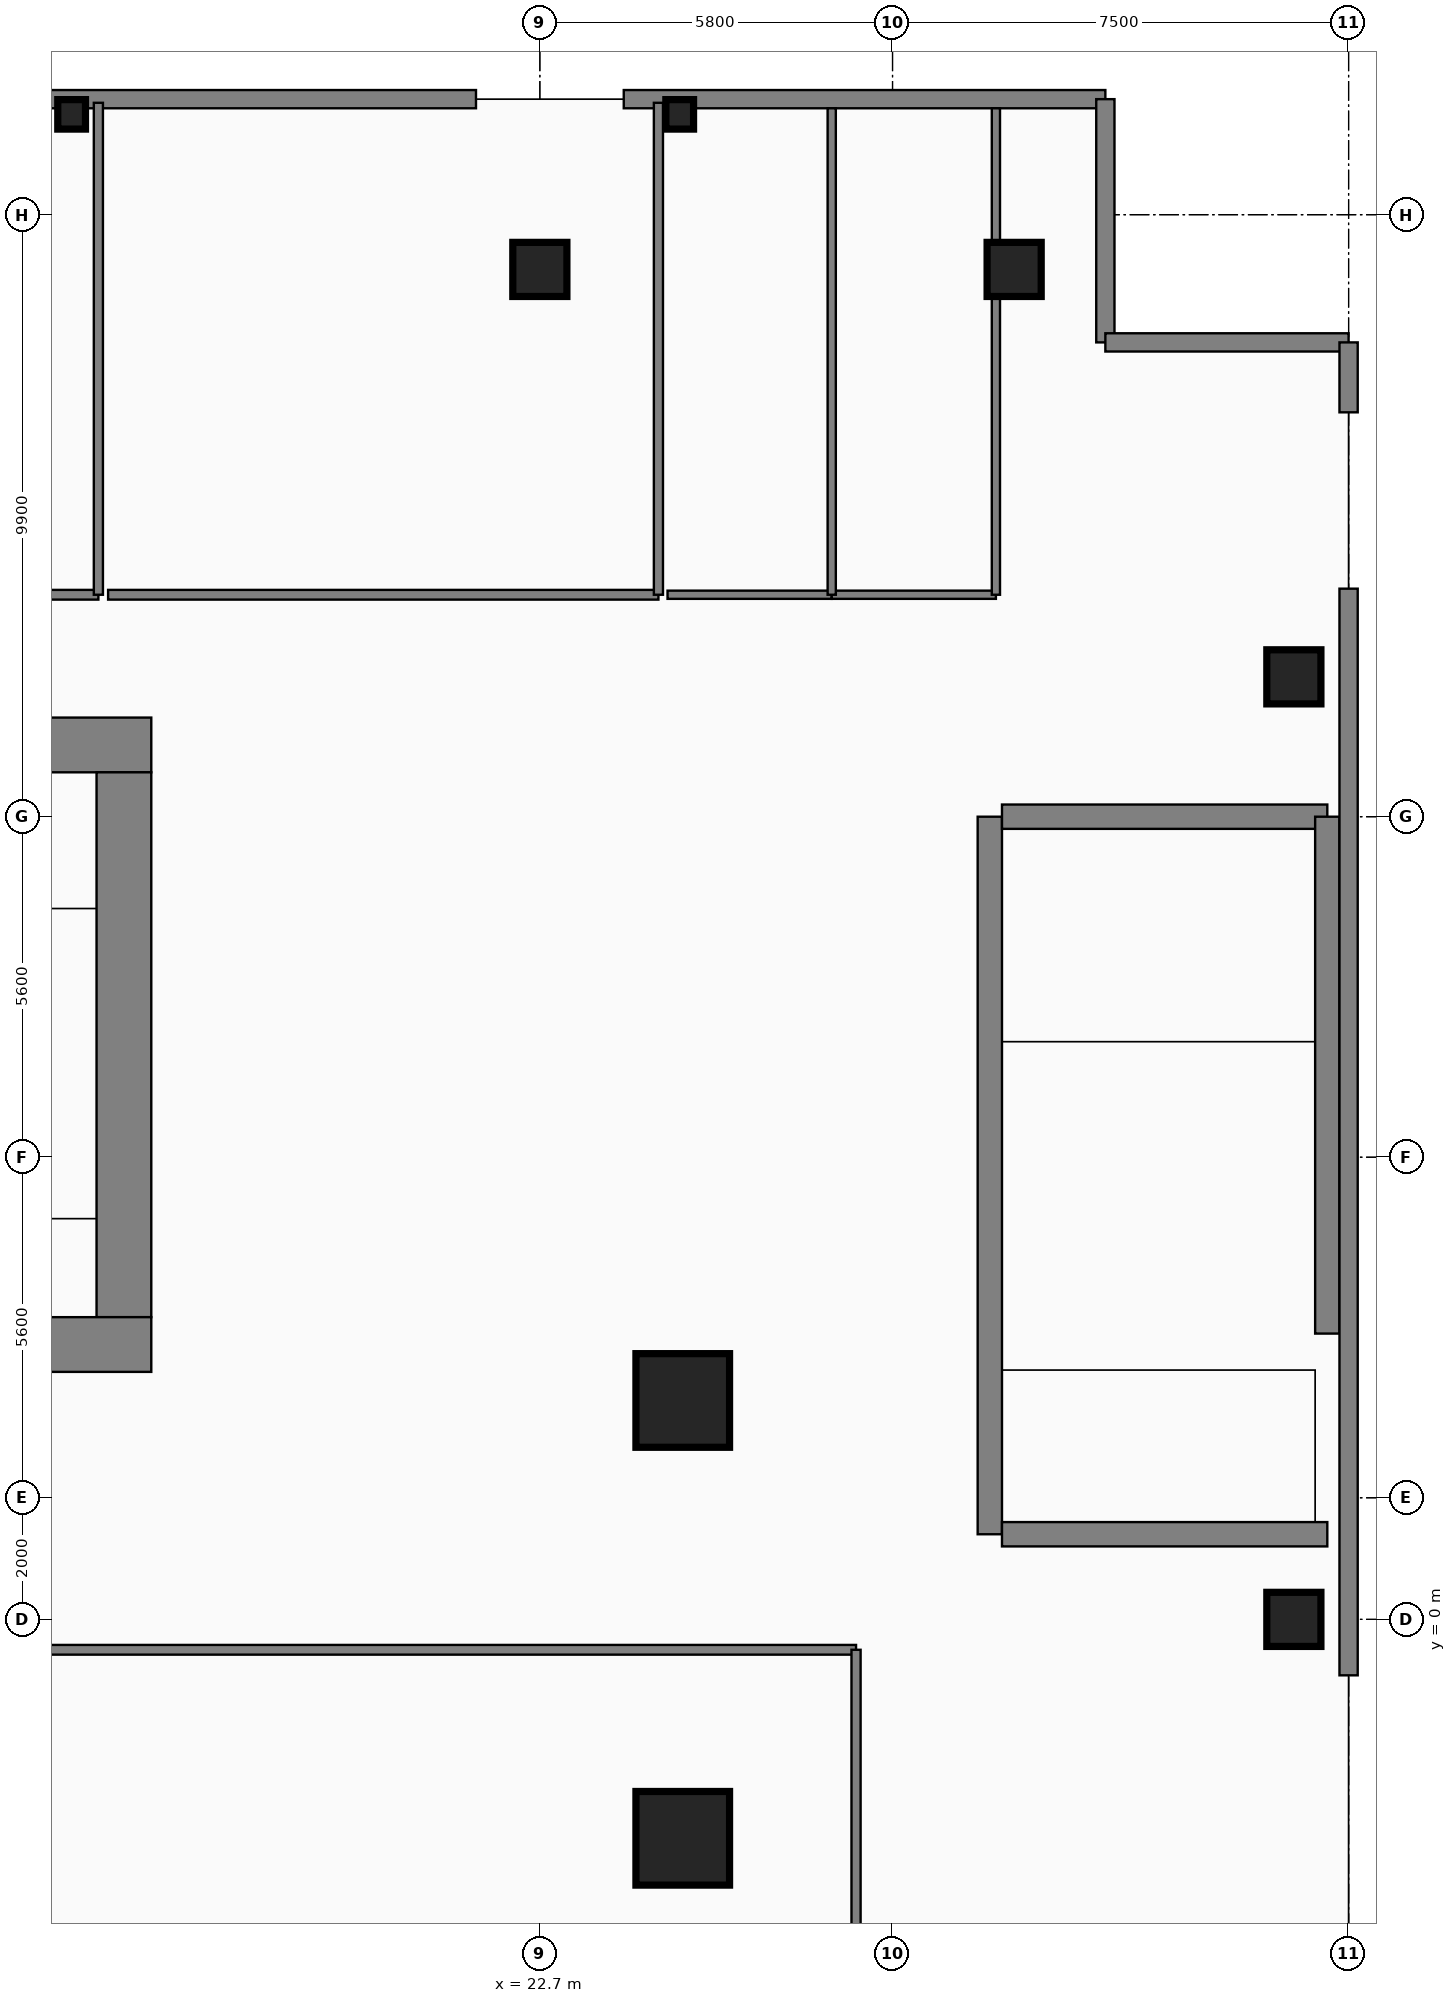
"""IFC4 building model, lengths in metres.
Left out: names, types, materials, properties, quantities, classifications, styles, units other than length and angle.
Written with IfcOpenShell. Run it as: python <this file> out.ifc"""

import sys

from ifc_helpers import new_model, si_unit, direction, frame, frame_2d, origin, origin_2d, place, context, subcontext, project, spatial, rectangle, i_section, extrude, element, fill, save


model = new_model("IFC4")
c1 = context("Model", 3, precision=1e-05, world=origin(), true_north=direction((0.0, 1.0)))
c2 = subcontext(c1, "Body", "Model", "MODEL_VIEW")
j1 = project(units=[si_unit("LENGTHUNIT", "METRE"), si_unit("PLANEANGLEUNIT", "RADIAN")], contexts=[c1])
p1 = place(None, origin())
s1 = spatial("IfcSite", under=j1, at=p1, CompositionType="ELEMENT")
p2 = place(p1, origin())
s2 = spatial("IfcBuilding", under=s1, at=p2, CompositionType="ELEMENT")
p3 = place(p2, origin())
s3 = spatial("IfcBuildingStorey", under=s2, at=p3, CompositionType="ELEMENT", Elevation=0.0)
p4 = place(p3, frame((11.6, 14.38, 0.0), z_axis=(0.0, 0.0, 1.0), x_axis=(1.0, 0.0, 0.0)))
e1 = element("IfcWall", 1, at=p4, inside=s3, PredefinedType="SHEAR", context=c2, shape_type="SweptSolid", body=[
    extrude(rectangle(XDim=4.71, YDim=0.9, at=frame_2d((2.355, 0.0))), origin(), (0.0, 0.0, 1.0), 5.81),
])
p5 = place(p3, frame((15.86, 4.97, 0.0), z_axis=(0.0, 0.0, 1.0), x_axis=(0.0, 1.0, 0.0)))
e2 = element("IfcWall", 2, at=p5, inside=s3, PredefinedType="SHEAR", context=c2, shape_type="SweptSolid", body=[
    extrude(rectangle(XDim=8.96, YDim=0.9, at=frame_2d((4.48, 0.0))), origin(), (0.0, 0.0, 1.0), 5.81),
])
p6 = place(p3, frame((11.6, 4.52, 0.0), z_axis=(0.0, 0.0, 1.0), x_axis=(1.0, 0.0, 0.0)))
e3 = element("IfcWall", 3, at=p6, inside=s3, PredefinedType="SHEAR", context=c2, shape_type="SweptSolid", body=[
    extrude(rectangle(XDim=4.71, YDim=0.9, at=frame_2d((2.355, 0.0))), origin(), (0.0, 0.0, 1.0), 5.81),
])
p7 = place(p3, frame((30.1, 13.2, 0.0), z_axis=(0.0, 0.0, 1.0), x_axis=(0.0, -1.0, 0.0)))
e4 = element("IfcWall", 4, at=p7, inside=s3, PredefinedType="SHEAR", context=c2, shape_type="SweptSolid", body=[
    extrude(rectangle(XDim=11.8, YDim=0.4, at=frame_2d((5.9, 0.0))), origin(), (0.0, 0.0, 1.0), 5.81),
])
p8 = place(p7, frame((9.7, 0.0, 0.0)))
e5 = element("IfcOpeningElement", 5, at=p8, cuts=e4, PredefinedType="OPENING", context=c2, shape_type="SweptSolid", body=[
    extrude(rectangle(XDim=1.12, YDim=2.22, at=frame_2d((0.56, 1.11))), frame((0.0, 0.21, 0.0), z_axis=(0.0, -1.0, 0.0), x_axis=(1.0, 0.0, 0.0)), (0.0, 0.0, 1.0), 0.42),
])
for number, where, z_axis, x_axis in (
    (6, (30.3, 1.4, 0.0), (0.0, 0.0, 1.0), (1.0, 0.0, 0.0)),
    (7, (30.3, 13.2, 0.0), (0.0, 0.0, 1.0), (1.0, 0.0, 0.0)),
):
    element("IfcWall", number, at=place(p3, frame(where, z_axis=z_axis, x_axis=x_axis)), inside=s3, PredefinedType="SHEAR", context=c2, shape_type="SweptSolid", body=[
        extrude(rectangle(XDim=5.35, YDim=0.4, at=frame_2d((2.675, 0.0))), origin(), (0.0, 0.0, 1.0), 5.81),
    ])
p9 = place(p3, frame((35.65, 4.7, 0.0), z_axis=(0.0, 0.0, 1.0), x_axis=(0.0, 1.0, 0.0)))
e8 = element("IfcWall", 8, at=p9, inside=s3, PredefinedType="SHEAR", context=c2, shape_type="SweptSolid", body=[
    extrude(rectangle(XDim=8.5, YDim=0.4, at=frame_2d((4.25, 0.0))), origin(), (0.0, 0.0, 1.0), 5.81),
])
for number, where, z_axis, x_axis in (
    (9, (25.05, -3.6, 0.0), (0.0, 0.0, 1.0), (1.0, 0.0, 0.0)),
    (10, (25.05, 3.6, 0.0), (0.0, 0.0, 1.0), (1.0, 0.0, 0.0)),
):
    element("IfcColumn", number, at=place(p3, frame(where, z_axis=z_axis, x_axis=x_axis)), inside=s3, PredefinedType="COLUMN", context=c2, shape_type="SweptSolid", body=[
        extrude(rectangle(XDim=1.5, YDim=1.5, at=origin_2d()), origin(), (0.0, 0.0, 1.0), 6.0),
    ])
for number, where, z_axis, x_axis in (
    (11, (30.5, 22.2, 0.0), (0.0, 0.0, 1.0), (1.0, 0.0, 0.0)),
    (12, (35.1, 0.0, 0.0), (0.0, 0.0, 1.0), (1.0, 0.0, 0.0)),
    (13, (35.1, 15.5, 0.0), (0.0, 0.0, 1.0), (1.0, 0.0, 0.0)),
    (14, (22.7, 22.2, 0.0), (0.0, 0.0, 1.0), (1.0, 0.0, 0.0)),
):
    element("IfcColumn", number, at=place(p3, frame(where, z_axis=z_axis, x_axis=x_axis)), inside=s3, PredefinedType="COLUMN", context=c2, shape_type="SweptSolid", body=[
        extrude(rectangle(XDim=0.85, YDim=0.85, at=origin_2d()), origin(), (0.0, 0.0, 1.0), 6.0),
    ])
for number, where, z_axis, x_axis in (
    (15, (15.0, 24.75, -0.27), (0.0, 0.0, 1.0), (1.0, 0.0, 0.0)),
    (16, (25.0, 24.75, -0.27), (0.0, 0.0, 1.0), (1.0, 0.0, 0.0)),
):
    element("IfcColumn", number, at=place(p3, frame(where, z_axis=z_axis, x_axis=x_axis)), inside=s3, PredefinedType="PILASTER", context=c2, shape_type="SweptSolid", body=[
        extrude(i_section(OverallWidth=0.416, OverallDepth=0.445, WebThickness=0.039, FlangeThickness=0.063, at=origin_2d()), origin(), (0.0, 0.0, 1.0), 6.02),
    ])
p10 = place(p3, frame((14.08, 25.0, 0.0), z_axis=(0.0, 0.0, 1.0), x_axis=(1.0, 0.0, 0.0)))
e17 = element("IfcWall", 17, at=p10, inside=s3, PredefinedType="STANDARD", context=c2, shape_type="SweptSolid", body=[
    extrude(rectangle(XDim=7.57, YDim=0.3, at=frame_2d((3.785, 0.0))), origin(), (0.0, 0.0, 1.0), 5.75),
])
p11 = place(p10, frame((4.52, 0.0, 0.0)))
e18 = element("IfcOpeningElement", 18, at=p11, cuts=e17, PredefinedType="OPENING", context=c2, shape_type="SweptSolid", body=[
    extrude(rectangle(XDim=2.4, YDim=2.45, at=frame_2d((1.2, 1.225))), frame((0.0, 0.16, 0.0), z_axis=(0.0, -1.0, 0.0), x_axis=(1.0, 0.0, 0.0)), (0.0, 0.0, 1.0), 0.32),
])
p12 = place(p3, frame((24.08, 25.0, 0.0), z_axis=(0.0, 0.0, 1.0), x_axis=(1.0, 0.0, 0.0)))
e19 = element("IfcWall", 19, at=p12, inside=s3, PredefinedType="STANDARD", context=c2, shape_type="SweptSolid", body=[
    extrude(rectangle(XDim=7.92, YDim=0.3, at=frame_2d((3.96, 0.0))), origin(), (0.0, 0.0, 1.0), 5.75),
])
for number, where, z_axis, x_axis in (
    (20, (32.0, 25.0, 0.0), (0.0, 0.0, 1.0), (0.0, -1.0, 0.0)),
    (21, (32.0, 21.0, 0.0), (0.0, 0.0, 1.0), (1.0, 0.0, 0.0)),
):
    element("IfcWall", number, at=place(p3, frame(where, z_axis=z_axis, x_axis=x_axis)), inside=s3, PredefinedType="STANDARD", context=c2, shape_type="SweptSolid", body=[
        extrude(rectangle(XDim=4.0, YDim=0.3, at=frame_2d((2.0, 0.0))), origin(), (0.0, 0.0, 1.0), 5.75),
    ])
p13 = place(p3, frame((36.0, 21.0, 0.0), z_axis=(0.0, 0.0, 1.0), x_axis=(0.0, -1.0, 0.0)))
e22 = element("IfcWall", 22, at=p13, inside=s3, PredefinedType="STANDARD", context=c2, shape_type="SweptSolid", body=[
    extrude(rectangle(XDim=1.15, YDim=0.3, at=frame_2d((0.575, 0.0))), origin(), (0.0, 0.0, 1.0), 5.75),
])
p14 = place(p3, frame((36.0, 16.95, 0.0), z_axis=(0.0, 0.0, 1.0), x_axis=(0.0, -1.0, 0.0)))
e23 = element("IfcWall", 23, at=p14, inside=s3, PredefinedType="STANDARD", context=c2, shape_type="SweptSolid", body=[
    extrude(rectangle(XDim=17.87, YDim=0.3, at=frame_2d((8.935, 0.0))), origin(), (0.0, 0.0, 1.0), 5.75),
])
p15 = place(p14, frame((13.35, 0.0, 0.0)))
e24 = element("IfcOpeningElement", 24, at=p15, cuts=e23, PredefinedType="OPENING", context=c2, shape_type="SweptSolid", body=[
    extrude(rectangle(XDim=1.8, YDim=2.4, at=frame_2d((0.9, 1.2))), frame((0.0, 0.16, 0.0), z_axis=(0.0, -1.0, 0.0), x_axis=(1.0, 0.0, 0.0)), (0.0, 0.0, 1.0), 0.32),
])
p16 = place(p14, frame((0.65, 0.0, 0.0)))
e25 = element("IfcOpeningElement", 25, at=p16, cuts=e23, PredefinedType="OPENING", context=c2, shape_type="SweptSolid", body=[
    extrude(rectangle(XDim=3.6, YDim=3.4, at=frame_2d((1.8, 1.7))), frame((0.0, 0.16, 0.0), z_axis=(0.0, -1.0, 0.0), x_axis=(1.0, 0.0, 0.0)), (0.0, 0.0, 1.0), 0.32),
])
p17 = place(p3, frame((-15.44, 16.85, 0.0), z_axis=(0.0, 0.0, 1.0), x_axis=(1.0, 0.0, 0.0)))
e26 = element("IfcWall", 26, at=p17, inside=s3, PredefinedType="PARTITIONING", context=c2, shape_type="SweptSolid", body=[
    extrude(rectangle(XDim=30.88, YDim=0.16, at=frame_2d((15.44, 0.0))), origin(), (0.0, 0.0, 1.0), 5.217),
])
p18 = place(p17, frame((14.9, 0.0, 0.0)))
e27 = element("IfcOpeningElement", 27, at=p18, cuts=e26, PredefinedType="OPENING", context=c2, shape_type="SweptSolid", body=[
    extrude(rectangle(XDim=1.08, YDim=2.18, at=frame_2d((0.54, 1.09))), frame((0.0, 0.09, 0.0), z_axis=(0.0, -1.0, 0.0), x_axis=(1.0, 0.0, 0.0)), (0.0, 0.0, 1.0), 0.18),
])
p19 = place(p3, frame((15.6, 16.85, 0.0), z_axis=(0.0, 0.0, 1.0), x_axis=(1.0, 0.0, 0.0)))
e28 = element("IfcWall", 28, at=p19, inside=s3, PredefinedType="PARTITIONING", context=c2, shape_type="SweptSolid", body=[
    extrude(rectangle(XDim=9.05, YDim=0.16, at=frame_2d((4.525, 0.0))), origin(), (0.0, 0.0, 1.0), 5.75),
])
p20 = place(p19, frame((3.985, 0.0, 0.0)))
e29 = element("IfcOpeningElement", 29, at=p20, cuts=e28, PredefinedType="OPENING", context=c2, shape_type="SweptSolid", body=[
    extrude(rectangle(XDim=1.08, YDim=2.18, at=frame_2d((0.54, 1.09))), frame((0.0, 0.09, 0.0), z_axis=(0.0, -1.0, 0.0), x_axis=(1.0, 0.0, 0.0)), (0.0, 0.0, 1.0), 0.18),
])
p21 = place(p3, frame((10.76, -0.5, 0.0), z_axis=(0.0, 0.0, 1.0), x_axis=(1.0, 0.0, 0.0)))
e30 = element("IfcWall", 30, at=p21, inside=s3, PredefinedType="PARTITIONING", context=c2, shape_type="SweptSolid", body=[
    extrude(rectangle(XDim=17.14, YDim=0.16, at=frame_2d((8.57, 0.0))), origin(), (0.0, 0.0, 1.0), 5.75),
])
p22 = place(p21, frame((8.03, 0.0, 0.0)))
e31 = element("IfcOpeningElement", 31, at=p22, cuts=e30, PredefinedType="OPENING", context=c2, shape_type="SweptSolid", body=[
    extrude(rectangle(XDim=1.08, YDim=2.18, at=frame_2d((0.54, 1.09))), frame((0.0, 0.09, 0.0), z_axis=(0.0, -1.0, 0.0), x_axis=(1.0, 0.0, 0.0)), (0.0, 0.0, 1.0), 0.18),
])
p23 = place(p3, frame((24.8, 16.85, 0.0), z_axis=(0.0, 0.0, 1.0), x_axis=(1.0, 0.0, 0.0)))
e32 = element("IfcWall", 32, at=p23, inside=s3, PredefinedType="PLUMBINGWALL", context=c2, shape_type="SweptSolid", body=[
    extrude(rectangle(XDim=2.7, YDim=0.135, at=frame_2d((1.35, 0.0))), origin(), (0.0, 0.0, 1.0), 5.75),
])
p24 = place(p23, frame((0.89, 0.0, 0.0)))
e33 = element("IfcOpeningElement", 33, at=p24, cuts=e32, PredefinedType="OPENING", context=c2, shape_type="SweptSolid", body=[
    extrude(rectangle(XDim=0.92, YDim=2.12, at=frame_2d((0.46, 1.06))), frame((0.0, 0.077, 0.0), z_axis=(0.0, -1.0, 0.0), x_axis=(1.0, 0.0, 0.0)), (0.0, 0.0, 1.0), 0.155),
])
p25 = place(p3, frame((27.5, 16.85, 0.0), z_axis=(0.0, 0.0, 1.0), x_axis=(1.0, 0.0, 0.0)))
e34 = element("IfcWall", 34, at=p25, inside=s3, PredefinedType="PLUMBINGWALL", context=c2, shape_type="SweptSolid", body=[
    extrude(rectangle(XDim=2.7, YDim=0.135, at=frame_2d((1.35, 0.0))), origin(), (0.0, 0.0, 1.0), 5.75),
])
p26 = place(p25, frame((0.89, 0.0, 0.0)))
e35 = element("IfcOpeningElement", 35, at=p26, cuts=e34, PredefinedType="OPENING", context=c2, shape_type="SweptSolid", body=[
    extrude(rectangle(XDim=0.92, YDim=2.12, at=frame_2d((0.46, 1.06))), frame((0.0, 0.077, 0.0), z_axis=(0.0, -1.0, 0.0), x_axis=(1.0, 0.0, 0.0)), (0.0, 0.0, 1.0), 0.155),
])
for number, where, z_axis, x_axis in (
    (36, (15.44, 16.85, 0.0), (0.0, 0.0, 1.0), (0.0, 1.0, 0.0)),
    (37, (24.65, 16.85, 0.0), (0.0, 0.0, 1.0), (0.0, 1.0, 0.0)),
):
    element("IfcWall", number, at=place(p3, frame(where, z_axis=z_axis, x_axis=x_axis)), inside=s3, PredefinedType="PARTITIONING", context=c2, shape_type="SweptSolid", body=[
        extrude(rectangle(XDim=8.09, YDim=0.15, at=frame_2d((4.045, 0.0))), origin(), (0.0, 0.0, 1.0), 5.75),
    ])
p27 = place(p3, frame((27.9, -8.8, 0.0), z_axis=(0.0, 0.0, 1.0), x_axis=(0.0, 1.0, 0.0)))
e38 = element("IfcWall", 38, at=p27, inside=s3, PredefinedType="PARTITIONING", context=c2, shape_type="SweptSolid", body=[
    extrude(rectangle(XDim=8.3, YDim=0.15, at=frame_2d((4.15, 0.0))), origin(), (0.0, 0.0, 1.0), 5.75),
])
for number, where, z_axis, x_axis in (
    (39, (30.2, 16.85, 0.0), (0.0, 0.0, 1.0), (0.0, 1.0, 0.0)),
    (40, (27.5, 16.85, 0.0), (0.0, 0.0, 1.0), (0.0, 1.0, 0.0)),
):
    element("IfcWall", number, at=place(p3, frame(where, z_axis=z_axis, x_axis=x_axis)), inside=s3, PredefinedType="PLUMBINGWALL", context=c2, shape_type="SweptSolid", body=[
        extrude(rectangle(XDim=8.0, YDim=0.135, at=frame_2d((4.0, 0.0))), origin(), (0.0, 0.0, 1.0), 5.75),
    ])
p28 = place(p11, origin())
e41 = element("IfcDoor", 41, at=p28, inside=s3, OperationType="DOUBLE_DOOR_SINGLE_SWING", PredefinedType="DOOR", context=c2, shape_type="SweptSolid", body=[
    extrude(rectangle(XDim=2.4, YDim=2.45, at=frame_2d((1.2, 1.225))), frame((0.0, 0.025, 0.0), z_axis=(0.0, -1.0, 0.0), x_axis=(1.0, 0.0, 0.0)), (0.0, 0.0, 1.0), 0.05),
])
fill(e18, e41)
p29 = place(p15, origin())
e42 = element("IfcDoor", 42, at=p29, inside=s3, OperationType="DOUBLE_DOOR_SINGLE_SWING", PredefinedType="DOOR", context=c2, shape_type="SweptSolid", body=[
    extrude(rectangle(XDim=1.8, YDim=2.4, at=frame_2d((0.9, 1.2))), frame((0.0, 0.025, 0.0), z_axis=(0.0, -1.0, 0.0), x_axis=(1.0, 0.0, 0.0)), (0.0, 0.0, 1.0), 0.05),
])
fill(e24, e42)
p30 = place(p16, origin())
e43 = element("IfcDoor", 43, at=p30, inside=s3, OperationType="ROLLINGUP", PredefinedType="GATE", context=c2, shape_type="SweptSolid", body=[
    extrude(rectangle(XDim=3.6, YDim=3.4, at=frame_2d((1.8, 1.7))), frame((0.0, 0.025, 0.0), z_axis=(0.0, -1.0, 0.0), x_axis=(1.0, 0.0, 0.0)), (0.0, 0.0, 1.0), 0.05),
])
fill(e25, e43)
p31 = place(p8, origin())
e44 = element("IfcDoor", 44, at=p31, inside=s3, OperationType="SINGLE_SWING_LEFT", PredefinedType="DOOR", context=c2, shape_type="SweptSolid", body=[
    extrude(rectangle(XDim=1.12, YDim=2.22, at=frame_2d((0.56, 1.11))), frame((0.0, 0.025, 0.0), z_axis=(0.0, -1.0, 0.0), x_axis=(1.0, 0.0, 0.0)), (0.0, 0.0, 1.0), 0.05),
])
fill(e5, e44)
p32 = place(p20, origin())
e45 = element("IfcDoor", 45, at=p32, inside=s3, OperationType="SINGLE_SWING_RIGHT", PredefinedType="DOOR", context=c2, shape_type="SweptSolid", body=[
    extrude(rectangle(XDim=1.08, YDim=2.18, at=frame_2d((0.54, 1.09))), frame((0.0, 0.025, 0.0), z_axis=(0.0, -1.0, 0.0), x_axis=(1.0, 0.0, 0.0)), (0.0, 0.0, 1.0), 0.05),
])
fill(e29, e45)
p33 = place(p22, origin())
e46 = element("IfcDoor", 46, at=p33, inside=s3, OperationType="SINGLE_SWING_RIGHT", PredefinedType="DOOR", context=c2, shape_type="SweptSolid", body=[
    extrude(rectangle(XDim=1.08, YDim=2.18, at=frame_2d((0.54, 1.09))), frame((0.0, 0.025, 0.0), z_axis=(0.0, -1.0, 0.0), x_axis=(1.0, 0.0, 0.0)), (0.0, 0.0, 1.0), 0.05),
])
fill(e31, e46)
p34 = place(p24, origin())
e47 = element("IfcDoor", 47, at=p34, inside=s3, OperationType="SINGLE_SWING_RIGHT", PredefinedType="DOOR", context=c2, shape_type="SweptSolid", body=[
    extrude(rectangle(XDim=0.92, YDim=2.12, at=frame_2d((0.46, 1.06))), frame((0.0, 0.025, 0.0), z_axis=(0.0, -1.0, 0.0), x_axis=(1.0, 0.0, 0.0)), (0.0, 0.0, 1.0), 0.05),
])
fill(e33, e47)
p35 = place(p26, origin())
e48 = element("IfcDoor", 48, at=p35, inside=s3, OperationType="SINGLE_SWING_LEFT", PredefinedType="DOOR", context=c2, shape_type="SweptSolid", body=[
    extrude(rectangle(XDim=0.92, YDim=2.12, at=frame_2d((0.46, 1.06))), frame((0.0, 0.025, 0.0), z_axis=(0.0, -1.0, 0.0), x_axis=(1.0, 0.0, 0.0)), (0.0, 0.0, 1.0), 0.05),
])
fill(e35, e48)
save(model, sys.argv[1])
